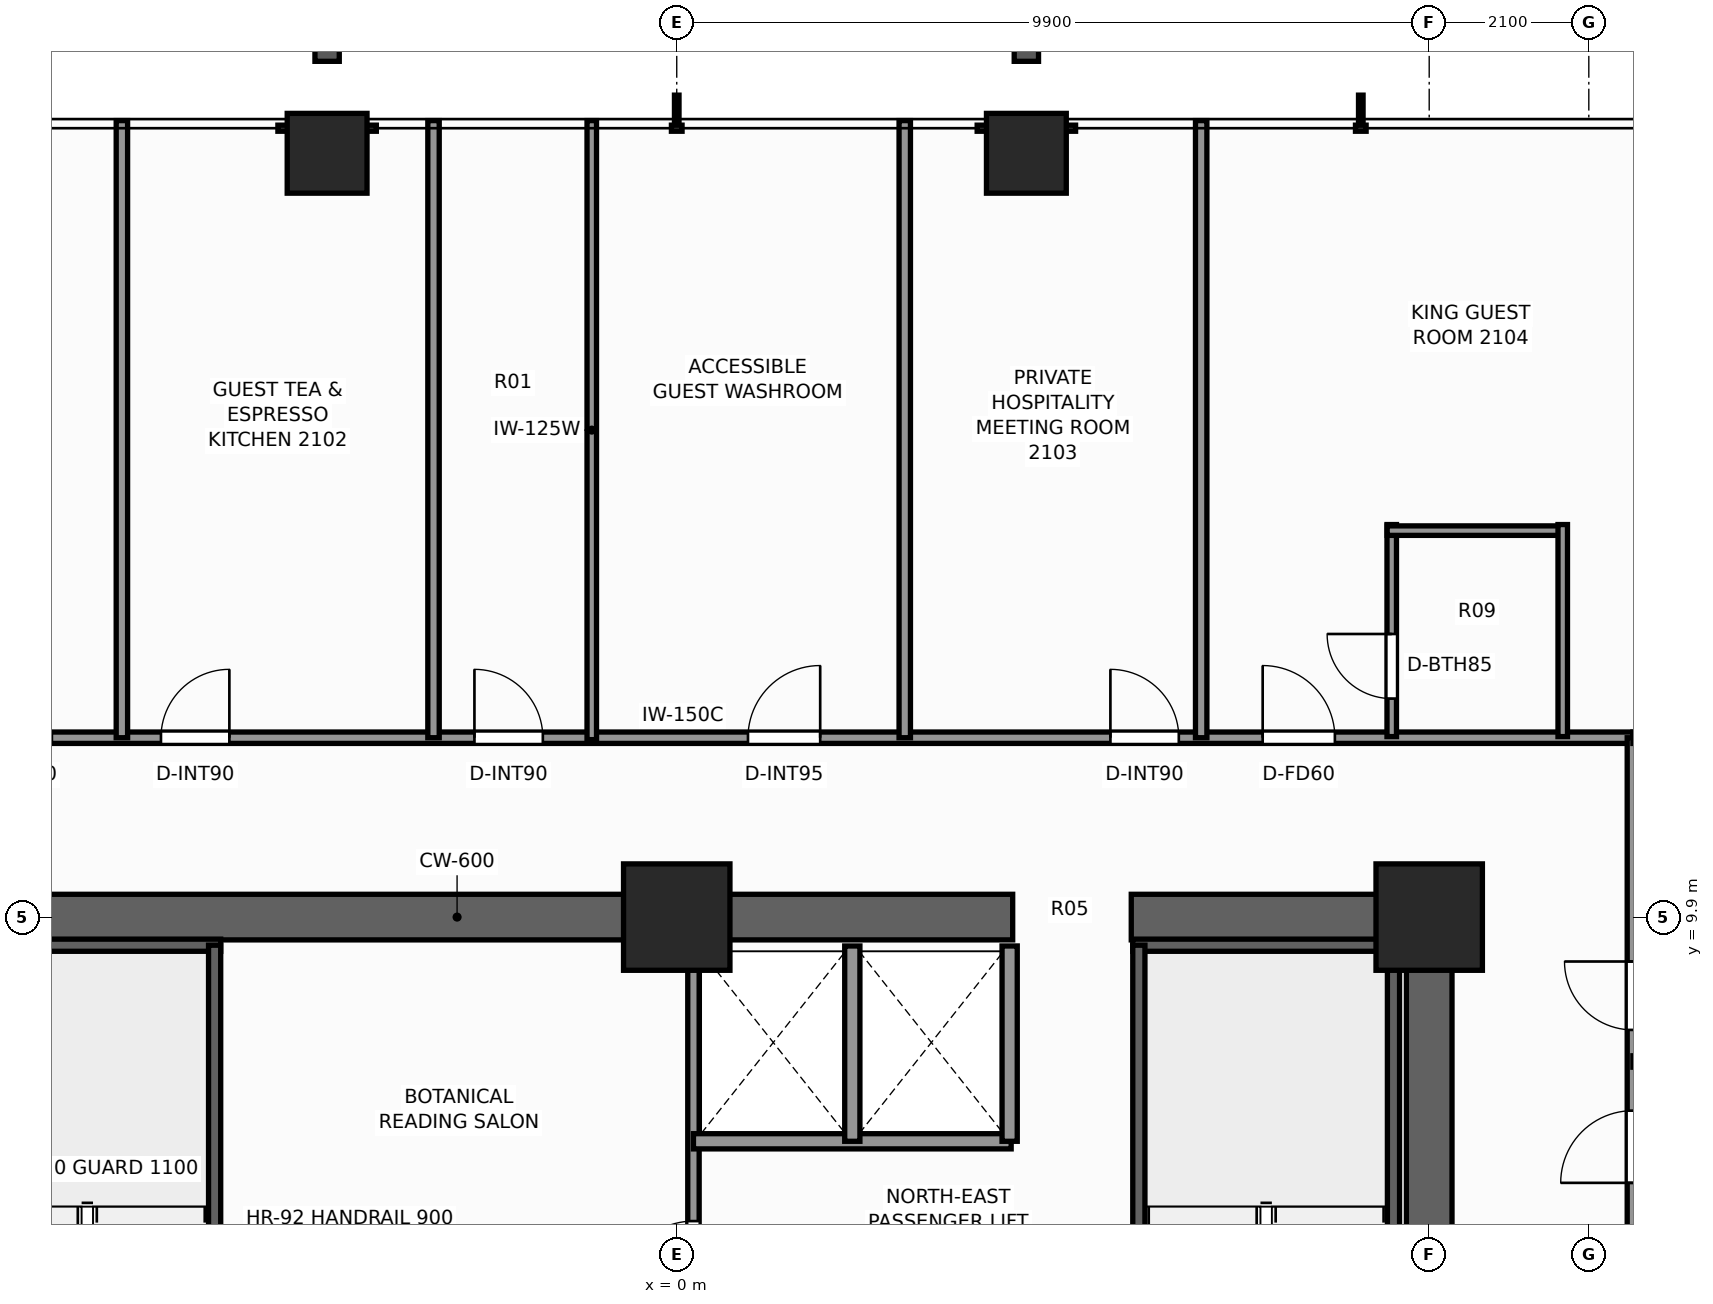
"""IFC4 building model, lengths in metres.
Left out: names, types, materials, properties, quantities, classifications, styles, units other than length and angle.
Written with IfcOpenShell. Run it as: python <this file> out.ifc"""

import sys

from ifc_helpers import new_model, si_unit, direction, frame, frame_2d, origin, origin_2d, place, context, subcontext, project, spatial, rectangle, extrude, element, fill, save


model = new_model("IFC4")
c1 = context("Model", 3, precision=1e-05, world=origin(), true_north=direction((0.0, 1.0)))
c2 = subcontext(c1, "Body", "Model", "MODEL_VIEW")
j1 = project(units=[si_unit("LENGTHUNIT", "METRE"), si_unit("PLANEANGLEUNIT", "RADIAN")], contexts=[c1])
p1 = place(None, origin())
s1 = spatial("IfcSite", under=j1, at=p1, CompositionType="ELEMENT")
p2 = place(p1, origin())
s2 = spatial("IfcBuilding", under=s1, at=p2, CompositionType="ELEMENT")
p3 = place(p2, frame((0.0, 0.0, 75.5)))
s3 = spatial("IfcBuildingStorey", under=s2, at=p3, CompositionType="ELEMENT", Elevation=75.5)
p4 = place(p3, frame((-10.2, 9.9, 0.0), z_axis=(0.0, 0.0, 1.0), x_axis=(1.0, 0.0, 0.0)))
e1 = element("IfcWall", 1, at=p4, inside=s3, PredefinedType="SHEAR", context=c2, shape_type="SweptSolid", body=[
    extrude(rectangle(XDim=14.62, YDim=0.6, at=frame_2d((7.31, 0.0))), origin(), (0.0, 0.0, 1.0), 3.3),
])
p5 = place(p3, frame((5.98, 9.9, 0.0), z_axis=(0.0, 0.0, 1.0), x_axis=(1.0, 0.0, 0.0)))
e2 = element("IfcWall", 2, at=p5, inside=s3, PredefinedType="SHEAR", context=c2, shape_type="SweptSolid", body=[
    extrude(rectangle(XDim=4.22, YDim=0.6, at=frame_2d((2.11, 0.0))), origin(), (0.0, 0.0, 1.0), 3.3),
])
p6 = place(p3, frame((9.9, -3.7, 0.0), z_axis=(0.0, 0.0, 1.0), x_axis=(0.0, 1.0, 0.0)))
e3 = element("IfcWall", 3, at=p6, inside=s3, PredefinedType="SHEAR", context=c2, shape_type="SweptSolid", body=[
    extrude(rectangle(XDim=13.3, YDim=0.6, at=frame_2d((6.65, 0.0))), origin(), (0.0, 0.0, 1.0), 3.3),
])
p7 = place(p6, frame((0.35, 0.0, 0.0)))
e4 = element("IfcOpeningElement", 4, at=p7, cuts=e3, PredefinedType="OPENING", context=c2, shape_type="SweptSolid", body=[
    extrude(rectangle(XDim=1.1, YDim=2.2, at=frame_2d((0.55, 1.1))), frame((0.0, 0.31, 0.0), z_axis=(0.0, -1.0, 0.0), x_axis=(1.0, 0.0, 0.0)), (0.0, 0.0, 1.0), 0.62),
])
for number, where, z_axis, x_axis in (
    (5, (9.9, 9.9, 0.0), (0.0, 0.0, 1.0), (1.0, 0.0, 0.0)),
    (6, (0.0, 9.9, 0.0), (0.0, 0.0, 1.0), (1.0, 0.0, 0.0)),
):
    element("IfcColumn", number, at=place(p3, frame(where, z_axis=z_axis, x_axis=x_axis)), inside=s3, PredefinedType="COLUMN", context=c2, shape_type="SweptSolid", body=[
        extrude(rectangle(XDim=1.4, YDim=1.4, at=origin_2d()), origin(), (0.0, 0.0, 1.0), 3.3),
    ])
for number, where, z_axis, x_axis in (
    (7, (-4.6, 19.95, 0.0), (0.0, 0.0, 1.0), (1.0, 0.0, 0.0)),
    (8, (4.6, 19.95, 0.0), (0.0, 0.0, 1.0), (1.0, 0.0, 0.0)),
):
    element("IfcColumn", number, at=place(p3, frame(where, z_axis=z_axis, x_axis=x_axis)), inside=s3, PredefinedType="COLUMN", context=c2, shape_type="SweptSolid", body=[
        extrude(rectangle(XDim=1.05, YDim=1.05, at=origin_2d()), origin(), (0.0, 0.0, 1.0), 3.3),
    ])
p8 = place(p3, frame((-9.52, 9.53, 0.0), z_axis=(0.0, 0.0, 1.0), x_axis=(1.0, 0.0, 0.0)))
e9 = element("IfcWall", 9, at=p8, inside=s3, PredefinedType="SHEAR", context=c2, shape_type="SweptSolid", body=[
    extrude(rectangle(XDim=3.52, YDim=0.16, at=frame_2d((1.76, 0.0))), origin(), (0.0, 0.0, 1.0), 3.3),
])
p9 = place(p3, frame((-6.08, 1.97, 0.0), z_axis=(0.0, 0.0, 1.0), x_axis=(0.0, 1.0, 0.0)))
e10 = element("IfcWall", 10, at=p9, inside=s3, PredefinedType="SHEAR", context=c2, shape_type="SweptSolid", body=[
    extrude(rectangle(XDim=7.56, YDim=0.16, at=frame_2d((3.78, 0.0))), origin(), (0.0, 0.0, 1.0), 3.3),
])
p10 = place(p3, frame((6.0, 9.53, 0.0), z_axis=(0.0, 0.0, 1.0), x_axis=(1.0, 0.0, 0.0)))
e11 = element("IfcWall", 11, at=p10, inside=s3, PredefinedType="SHEAR", context=c2, shape_type="SweptSolid", body=[
    extrude(rectangle(XDim=3.52, YDim=0.16, at=frame_2d((1.76, 0.0))), origin(), (0.0, 0.0, 1.0), 3.3),
])
for number, where, z_axis, x_axis in (
    (12, (6.08, 1.97, 0.0), (0.0, 0.0, 1.0), (0.0, 1.0, 0.0)),
    (13, (9.43, 1.97, 0.0), (0.0, 0.0, 1.0), (0.0, 1.0, 0.0)),
):
    element("IfcWall", number, at=place(p3, frame(where, z_axis=z_axis, x_axis=x_axis)), inside=s3, PredefinedType="SHEAR", context=c2, shape_type="SweptSolid", body=[
        extrude(rectangle(XDim=7.56, YDim=0.16, at=frame_2d((3.78, 0.0))), origin(), (0.0, 0.0, 1.0), 3.3),
    ])
p11 = place(p3, frame((0.22, 4.3, 0.0), z_axis=(0.0, 0.0, 1.0), x_axis=(0.0, 1.0, 0.0)))
e14 = element("IfcWall", 14, at=p11, inside=s3, PredefinedType="PARTITIONING", context=c2, shape_type="SweptSolid", body=[
    extrude(rectangle(XDim=5.22, YDim=0.15, at=frame_2d((2.61, 0.0))), origin(), (0.0, 0.0, 1.0), 3.08),
])
p12 = place(p11, frame((0.65, 0.0, 0.0)))
e15 = element("IfcOpeningElement", 15, at=p12, cuts=e14, PredefinedType="OPENING", context=c2, shape_type="SweptSolid", body=[
    extrude(rectangle(XDim=0.95, YDim=2.06, at=frame_2d((0.475, 1.03))), frame((0.0, 0.085, 0.0), z_axis=(0.0, -1.0, 0.0), x_axis=(1.0, 0.0, 0.0)), (0.0, 0.0, 1.0), 0.17),
])
p13 = place(p3, frame((0.22, 6.95, 0.0), z_axis=(0.0, 0.0, 1.0), x_axis=(1.0, 0.0, 0.0)))
e16 = element("IfcWall", 16, at=p13, inside=s3, PredefinedType="SOLIDWALL", context=c2, shape_type="SweptSolid", body=[
    extrude(rectangle(XDim=4.18, YDim=0.2, at=frame_2d((2.09, 0.0))), origin(), (0.0, 0.0, 1.0), 3.08),
])
for number, where, z_axis, x_axis in (
    (17, (4.38, 6.95, 0.0), (0.0, 0.0, 1.0), (0.0, 1.0, 0.0)),
    (18, (2.31, 6.95, 0.0), (0.0, 0.0, 1.0), (0.0, 1.0, 0.0)),
):
    element("IfcWall", number, at=place(p3, frame(where, z_axis=z_axis, x_axis=x_axis)), inside=s3, PredefinedType="SOLIDWALL", context=c2, shape_type="SweptSolid", body=[
        extrude(rectangle(XDim=2.57, YDim=0.2, at=frame_2d((1.285, 0.0))), origin(), (0.0, 0.0, 1.0), 3.08),
    ])
p14 = place(p3, frame((-12.42, 12.26, 0.0), z_axis=(0.0, 0.0, 1.0), x_axis=(1.0, 0.0, 0.0)))
e19 = element("IfcWall", 19, at=p14, inside=s3, PredefinedType="PARTITIONING", context=c2, shape_type="SweptSolid", body=[
    extrude(rectangle(XDim=25.0, YDim=0.15, at=frame_2d((12.5, 0.0))), origin(), (0.0, 0.0, 1.0), 2.292),
])
p15 = place(p14, frame((3.299, 0.0, 0.0)))
e20 = element("IfcOpeningElement", 20, at=p15, cuts=e19, PredefinedType="OPENING", context=c2, shape_type="SweptSolid", body=[
    extrude(rectangle(XDim=0.9, YDim=2.06, at=frame_2d((0.45, 1.03))), frame((0.0, 0.085, 0.0), z_axis=(0.0, -1.0, 0.0), x_axis=(1.0, 0.0, 0.0)), (0.0, 0.0, 1.0), 0.17),
])
p16 = place(p14, frame((5.634, 0.0, 0.0)))
e21 = element("IfcOpeningElement", 21, at=p16, cuts=e19, PredefinedType="OPENING", context=c2, shape_type="SweptSolid", body=[
    extrude(rectangle(XDim=0.9, YDim=2.06, at=frame_2d((0.45, 1.03))), frame((0.0, 0.085, 0.0), z_axis=(0.0, -1.0, 0.0), x_axis=(1.0, 0.0, 0.0)), (0.0, 0.0, 1.0), 0.17),
])
p17 = place(p14, frame((9.758, 0.0, 0.0)))
e22 = element("IfcOpeningElement", 22, at=p17, cuts=e19, PredefinedType="OPENING", context=c2, shape_type="SweptSolid", body=[
    extrude(rectangle(XDim=0.9, YDim=2.06, at=frame_2d((0.45, 1.03))), frame((0.0, 0.085, 0.0), z_axis=(0.0, -1.0, 0.0), x_axis=(1.0, 0.0, 0.0)), (0.0, 0.0, 1.0), 0.17),
])
p18 = place(p14, frame((13.357, 0.0, 0.0)))
e23 = element("IfcOpeningElement", 23, at=p18, cuts=e19, PredefinedType="OPENING", context=c2, shape_type="SweptSolid", body=[
    extrude(rectangle(XDim=0.95, YDim=2.06, at=frame_2d((0.475, 1.03))), frame((0.0, 0.085, 0.0), z_axis=(0.0, -1.0, 0.0), x_axis=(1.0, 0.0, 0.0)), (0.0, 0.0, 1.0), 0.17),
])
p19 = place(p14, frame((18.125, 0.0, 0.0)))
e24 = element("IfcOpeningElement", 24, at=p19, cuts=e19, PredefinedType="OPENING", context=c2, shape_type="SweptSolid", body=[
    extrude(rectangle(XDim=0.9, YDim=2.06, at=frame_2d((0.45, 1.03))), frame((0.0, 0.085, 0.0), z_axis=(0.0, -1.0, 0.0), x_axis=(1.0, 0.0, 0.0)), (0.0, 0.0, 1.0), 0.17),
])
p20 = place(p14, frame((20.129, 0.0, 0.0)))
e25 = element("IfcOpeningElement", 25, at=p20, cuts=e19, PredefinedType="OPENING", context=c2, shape_type="SweptSolid", body=[
    extrude(rectangle(XDim=0.95, YDim=2.06, at=frame_2d((0.475, 1.03))), frame((0.0, 0.085, 0.0), z_axis=(0.0, -1.0, 0.0), x_axis=(1.0, 0.0, 0.0)), (0.0, 0.0, 1.0), 0.17),
])
p21 = place(p3, frame((12.58, -12.58, 0.0), z_axis=(0.0, 0.0, 1.0), x_axis=(0.0, 1.0, 0.0)))
e26 = element("IfcWall", 26, at=p21, inside=s3, PredefinedType="PARTITIONING", context=c2, shape_type="SweptSolid", body=[
    extrude(rectangle(XDim=24.84, YDim=0.15, at=frame_2d((12.42, 0.0))), origin(), (0.0, 0.0, 1.0), 2.292),
])
p22 = place(p21, frame((4.149, 0.0, 0.0)))
e27 = element("IfcOpeningElement", 27, at=p22, cuts=e26, PredefinedType="OPENING", context=c2, shape_type="SweptSolid", body=[
    extrude(rectangle(XDim=0.95, YDim=2.06, at=frame_2d((0.475, 1.03))), frame((0.0, 0.085, 0.0), z_axis=(0.0, -1.0, 0.0), x_axis=(1.0, 0.0, 0.0)), (0.0, 0.0, 1.0), 0.17),
])
p23 = place(p21, frame((10.28, 0.0, 0.0)))
e28 = element("IfcOpeningElement", 28, at=p23, cuts=e26, PredefinedType="OPENING", context=c2, shape_type="SweptSolid", body=[
    extrude(rectangle(XDim=0.95, YDim=2.06, at=frame_2d((0.475, 1.03))), frame((0.0, 0.085, 0.0), z_axis=(0.0, -1.0, 0.0), x_axis=(1.0, 0.0, 0.0)), (0.0, 0.0, 1.0), 0.17),
])
p24 = place(p21, frame((18.983, 0.0, 0.0)))
e29 = element("IfcOpeningElement", 29, at=p24, cuts=e26, PredefinedType="OPENING", context=c2, shape_type="SweptSolid", body=[
    extrude(rectangle(XDim=0.95, YDim=2.06, at=frame_2d((0.475, 1.03))), frame((0.0, 0.085, 0.0), z_axis=(0.0, -1.0, 0.0), x_axis=(1.0, 0.0, 0.0)), (0.0, 0.0, 1.0), 0.17),
])
p25 = place(p21, frame((20.996, 0.0, 0.0)))
e30 = element("IfcOpeningElement", 30, at=p25, cuts=e26, PredefinedType="OPENING", context=c2, shape_type="SweptSolid", body=[
    extrude(rectangle(XDim=0.9, YDim=2.06, at=frame_2d((0.45, 1.03))), frame((0.0, 0.085, 0.0), z_axis=(0.0, -1.0, 0.0), x_axis=(1.0, 0.0, 0.0)), (0.0, 0.0, 1.0), 0.17),
])
p26 = place(p3, frame((12.58, 12.26, 0.0), z_axis=(0.0, 0.0, 1.0), x_axis=(1.0, 0.0, 0.0)))
e31 = element("IfcWall", 31, at=p26, inside=s3, PredefinedType="PARTITIONING", context=c2, shape_type="SweptSolid", body=[
    extrude(rectangle(XDim=7.8, YDim=0.15, at=frame_2d((3.9, 0.0))), origin(), (0.0, 0.0, 1.0), 2.292),
])
p27 = place(p3, frame((-7.3, 12.26, 0.0), z_axis=(0.0, 0.0, 1.0), x_axis=(0.0, 1.0, 0.0)))
e32 = element("IfcWall", 32, at=p27, inside=s3, PredefinedType="PARTITIONING", context=c2, shape_type="SweptSolid", body=[
    extrude(rectangle(XDim=8.12, YDim=0.15, at=frame_2d((4.06, 0.0))), origin(), (0.0, 0.0, 1.0), 2.449),
])
for number, where, z_axis, x_axis in (
    (33, (-3.2, 12.26, 0.0), (0.0, 0.0, 1.0), (0.0, 1.0, 0.0)),
    (34, (3.0, 12.26, 0.0), (0.0, 0.0, 1.0), (0.0, 1.0, 0.0)),
):
    element("IfcWall", number, at=place(p3, frame(where, z_axis=z_axis, x_axis=x_axis)), inside=s3, PredefinedType="PARTITIONING", context=c2, shape_type="SweptSolid", body=[
        extrude(rectangle(XDim=8.12, YDim=0.15, at=frame_2d((4.06, 0.0))), origin(), (0.0, 0.0, 1.0), 2.369),
    ])
p28 = place(p3, frame((-1.118, 12.235, 0.0), z_axis=(0.0, 0.0, 1.0), x_axis=(0.0, 1.0, 0.0)))
e35 = element("IfcWall", 35, at=p28, inside=s3, PredefinedType="PARTITIONING", context=c2, shape_type="SweptSolid", body=[
    extrude(rectangle(XDim=8.145, YDim=0.125, at=frame_2d((4.072, 0.0))), origin(), (0.0, 0.0, 1.0), 2.449),
])
p29 = place(p3, frame((6.9, 12.26, 0.0), z_axis=(0.0, 0.0, 1.0), x_axis=(0.0, 1.0, 0.0)))
e36 = element("IfcWall", 36, at=p29, inside=s3, PredefinedType="PARTITIONING", context=c2, shape_type="SweptSolid", body=[
    extrude(rectangle(XDim=8.12, YDim=0.15, at=frame_2d((4.06, 0.0))), origin(), (0.0, 0.0, 1.0), 2.449),
])
p30 = place(p3, frame((9.407, 12.275, 0.0), z_axis=(0.0, 0.0, 1.0), x_axis=(0.0, 1.0, 0.0)))
e37 = element("IfcWall", 37, at=p30, inside=s3, PredefinedType="PARTITIONING", context=c2, shape_type="SweptSolid", body=[
    extrude(rectangle(XDim=2.79, YDim=0.125, at=frame_2d((1.395, 0.0))), origin(), (0.0, 0.0, 1.0), 3.08),
])
p31 = place(p30, frame((0.5, 0.0, 0.0)))
e38 = element("IfcOpeningElement", 38, at=p31, cuts=e37, PredefinedType="OPENING", context=c2, shape_type="SweptSolid", body=[
    extrude(rectangle(XDim=0.85, YDim=2.03, at=frame_2d((0.425, 1.015))), frame((0.0, 0.073, 0.0), z_axis=(0.0, -1.0, 0.0), x_axis=(1.0, 0.0, 0.0)), (0.0, 0.0, 1.0), 0.145),
])
p32 = place(p3, frame((9.347, 14.985, 0.0), z_axis=(0.0, 0.0, 1.0), x_axis=(1.0, 0.0, 0.0)))
e39 = element("IfcWall", 39, at=p32, inside=s3, PredefinedType="PARTITIONING", context=c2, shape_type="SweptSolid", body=[
    extrude(rectangle(XDim=2.37, YDim=0.125, at=frame_2d((1.185, 0.0))), origin(), (0.0, 0.0, 1.0), 2.292),
])
p33 = place(p3, frame((11.657, 12.275, 0.0), z_axis=(0.0, 0.0, 1.0), x_axis=(0.0, 1.0, 0.0)))
e40 = element("IfcWall", 40, at=p33, inside=s3, PredefinedType="PARTITIONING", context=c2, shape_type="SweptSolid", body=[
    extrude(rectangle(XDim=2.79, YDim=0.125, at=frame_2d((1.395, 0.0))), origin(), (0.0, 0.0, 1.0), 2.292),
])
p34 = place(p3, frame((12.58, 8.0, 0.0), z_axis=(0.0, 0.0, 1.0), x_axis=(1.0, 0.0, 0.0)))
e41 = element("IfcWall", 41, at=p34, inside=s3, PredefinedType="PARTITIONING", context=c2, shape_type="SweptSolid", body=[
    extrude(rectangle(XDim=7.8, YDim=0.15, at=frame_2d((3.9, 0.0))), origin(), (0.0, 0.0, 1.0), 2.449),
])
p35 = place(p12, origin())
e42 = element("IfcDoor", 42, at=p35, inside=s3, OperationType="SINGLE_SWING_LEFT", PredefinedType="DOOR", context=c2, shape_type="SweptSolid", body=[
    extrude(rectangle(XDim=0.95, YDim=2.06, at=frame_2d((0.475, 1.03))), frame((0.0, 0.025, 0.0), z_axis=(0.0, -1.0, 0.0), x_axis=(1.0, 0.0, 0.0)), (0.0, 0.0, 1.0), 0.05),
])
fill(e15, e42)
p36 = place(p16, origin())
e43 = element("IfcDoor", 43, at=p36, inside=s3, OperationType="SINGLE_SWING_RIGHT", PredefinedType="DOOR", context=c2, shape_type="SweptSolid", body=[
    extrude(rectangle(XDim=0.9, YDim=2.06, at=frame_2d((0.45, 1.03))), frame((0.0, 0.025, 0.0), z_axis=(0.0, -1.0, 0.0), x_axis=(1.0, 0.0, 0.0)), (0.0, 0.0, 1.0), 0.05),
])
fill(e21, e43)
p37 = place(p17, origin())
e44 = element("IfcDoor", 44, at=p37, inside=s3, OperationType="SINGLE_SWING_LEFT", PredefinedType="DOOR", context=c2, shape_type="SweptSolid", body=[
    extrude(rectangle(XDim=0.9, YDim=2.06, at=frame_2d((0.45, 1.03))), frame((0.0, 0.025, 0.0), z_axis=(0.0, -1.0, 0.0), x_axis=(1.0, 0.0, 0.0)), (0.0, 0.0, 1.0), 0.05),
])
fill(e22, e44)
p38 = place(p18, origin())
e45 = element("IfcDoor", 45, at=p38, inside=s3, OperationType="SINGLE_SWING_RIGHT", PredefinedType="DOOR", context=c2, shape_type="SweptSolid", body=[
    extrude(rectangle(XDim=0.95, YDim=2.06, at=frame_2d((0.475, 1.03))), frame((0.0, 0.025, 0.0), z_axis=(0.0, -1.0, 0.0), x_axis=(1.0, 0.0, 0.0)), (0.0, 0.0, 1.0), 0.05),
])
fill(e23, e45)
p39 = place(p19, origin())
e46 = element("IfcDoor", 46, at=p39, inside=s3, OperationType="SINGLE_SWING_LEFT", PredefinedType="DOOR", context=c2, shape_type="SweptSolid", body=[
    extrude(rectangle(XDim=0.9, YDim=2.06, at=frame_2d((0.45, 1.03))), frame((0.0, 0.025, 0.0), z_axis=(0.0, -1.0, 0.0), x_axis=(1.0, 0.0, 0.0)), (0.0, 0.0, 1.0), 0.05),
])
fill(e24, e46)
p40 = place(p31, origin())
e47 = element("IfcDoor", 47, at=p40, inside=s3, OperationType="SINGLE_SWING_RIGHT", PredefinedType="DOOR", context=c2, shape_type="SweptSolid", body=[
    extrude(rectangle(XDim=0.85, YDim=2.03, at=frame_2d((0.425, 1.015))), frame((0.0, 0.025, 0.0), z_axis=(0.0, -1.0, 0.0), x_axis=(1.0, 0.0, 0.0)), (0.0, 0.0, 1.0), 0.05),
])
fill(e38, e47)
p41 = place(p20, origin())
e48 = element("IfcDoor", 48, at=p41, inside=s3, OperationType="SINGLE_SWING_LEFT", PredefinedType="DOOR", context=c2, shape_type="SweptSolid", body=[
    extrude(rectangle(XDim=0.95, YDim=2.06, at=frame_2d((0.475, 1.03))), frame((0.0, 0.025, 0.0), z_axis=(0.0, -1.0, 0.0), x_axis=(1.0, 0.0, 0.0)), (0.0, 0.0, 1.0), 0.05),
])
fill(e25, e48)
p42 = place(p24, origin())
e49 = element("IfcDoor", 49, at=p42, inside=s3, OperationType="SINGLE_SWING_LEFT", PredefinedType="DOOR", context=c2, shape_type="SweptSolid", body=[
    extrude(rectangle(XDim=0.95, YDim=2.06, at=frame_2d((0.475, 1.03))), frame((0.0, 0.025, 0.0), z_axis=(0.0, -1.0, 0.0), x_axis=(1.0, 0.0, 0.0)), (0.0, 0.0, 1.0), 0.05),
])
fill(e29, e49)
p43 = place(p25, origin())
e50 = element("IfcDoor", 50, at=p43, inside=s3, OperationType="SINGLE_SWING_RIGHT", PredefinedType="DOOR", context=c2, shape_type="SweptSolid", body=[
    extrude(rectangle(XDim=0.9, YDim=2.06, at=frame_2d((0.45, 1.03))), frame((0.0, 0.025, 0.0), z_axis=(0.0, -1.0, 0.0), x_axis=(1.0, 0.0, 0.0)), (0.0, 0.0, 1.0), 0.05),
])
fill(e30, e50)
save(model, sys.argv[1])
